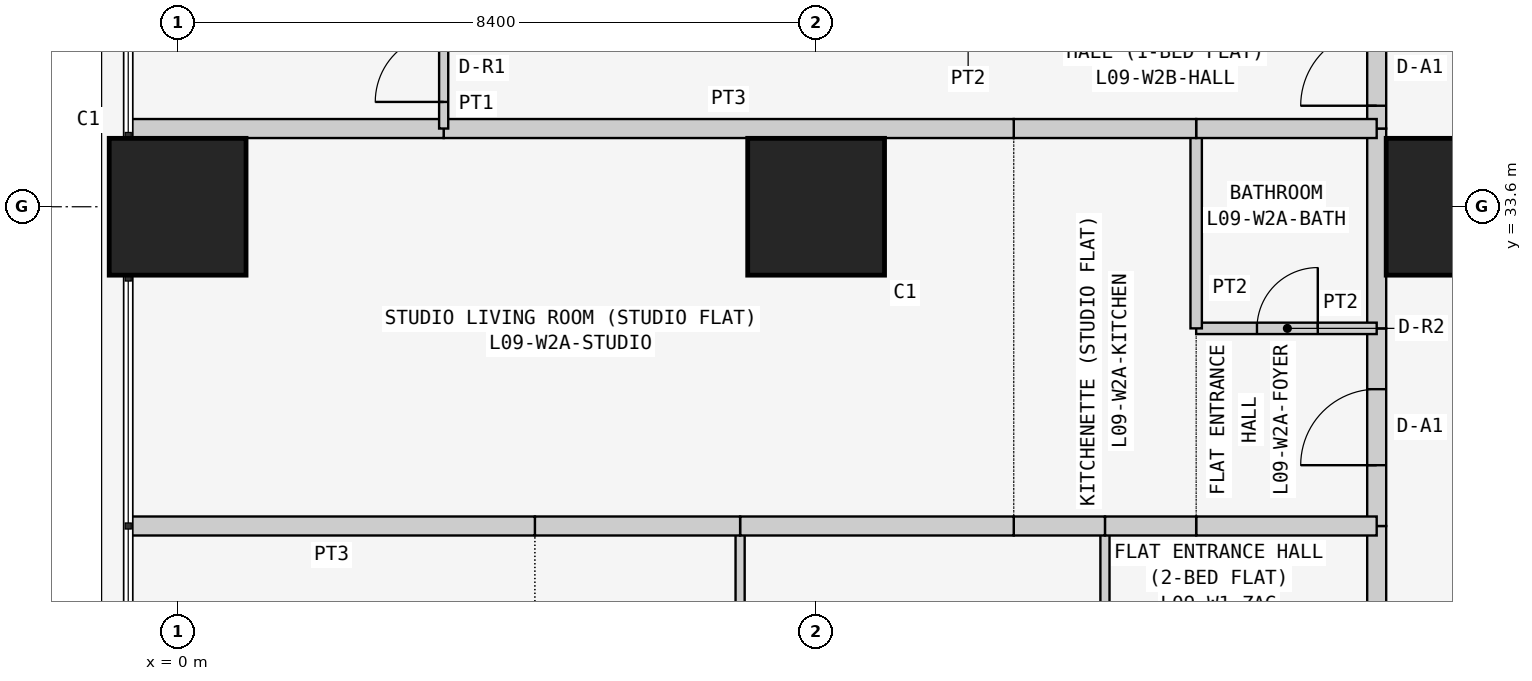
"""IFC4 building model, lengths in metres.
Left out: names, types, materials, properties, quantities, classifications, styles, units other than length and angle.
Written with IfcOpenShell. Run it as: python <this file> out.ifc"""

import sys

from ifc_helpers import new_model, si_unit, direction, frame, frame_2d, origin, origin_2d, place, context, subcontext, project, spatial, rectangle, extrude, element, fill, save


model = new_model("IFC4")
c1 = context("Model", 3, precision=1e-05, world=origin(), true_north=direction((0.0, 1.0)))
c2 = subcontext(c1, "Body", "Model", "MODEL_VIEW")
j1 = project(units=[si_unit("LENGTHUNIT", "METRE"), si_unit("PLANEANGLEUNIT", "RADIAN")], contexts=[c1])
p1 = place(None, origin())
s1 = spatial("IfcSite", under=j1, at=p1, CompositionType="ELEMENT")
p2 = place(p1, origin())
s2 = spatial("IfcBuilding", under=s1, at=p2, CompositionType="ELEMENT")
p3 = place(p2, frame((0.0, 0.0, 41.7)))
s3 = spatial("IfcBuildingStorey", under=s2, at=p3, CompositionType="ELEMENT", Elevation=41.7)
for number, where, z_axis, x_axis in (
    (1, (0.0, 33.6, 0.0), (0.0, 0.0, 1.0), (1.0, 0.0, 0.0)),
    (2, (8.4, 33.6, 0.0), (0.0, 0.0, 1.0), (1.0, 0.0, 0.0)),
    (3, (16.8, 33.6, 0.0), (0.0, 0.0, 1.0), (1.0, 0.0, 0.0)),
):
    element("IfcColumn", number, at=place(p3, frame(where, z_axis=z_axis, x_axis=x_axis)), inside=s3, PredefinedType="COLUMN", context=c2, shape_type="SweptSolid", body=[
        extrude(rectangle(XDim=1.8, YDim=1.8, at=origin_2d()), origin(), (0.0, 0.0, 1.0), 3.6),
    ])
p4 = place(p3, frame((15.775, 24.171, 0.0), z_axis=(0.0, 0.0, 1.0), x_axis=(0.0, 1.0, 0.0)))
e4 = element("IfcWall", 4, at=p4, inside=s3, PredefinedType="PARTITIONING", context=c2, shape_type="SweptSolid", body=[
    extrude(rectangle(XDim=5.229, YDim=0.25, at=frame_2d((2.615, 0.0))), origin(), (0.0, 0.0, 1.0), 3.45),
])
p5 = place(p4, frame((2.129, 0.0, 0.0)))
e5 = element("IfcOpeningElement", 5, at=p5, cuts=e4, PredefinedType="OPENING", context=c2, shape_type="SweptSolid", body=[
    extrude(rectangle(XDim=1.0, YDim=2.1, at=frame_2d((0.5, 1.05))), frame((0.0, 0.135, 0.0), z_axis=(0.0, -1.0, 0.0), x_axis=(1.0, 0.0, 0.0)), (0.0, 0.0, 1.0), 0.27),
])
p6 = place(p3, frame((15.775, 29.4, 0.0), z_axis=(0.0, 0.0, 1.0), x_axis=(0.0, 1.0, 0.0)))
e6 = element("IfcWall", 6, at=p6, inside=s3, PredefinedType="PARTITIONING", context=c2, shape_type="SweptSolid", body=[
    extrude(rectangle(XDim=2.6, YDim=0.25, at=frame_2d((1.3, 0.0))), origin(), (0.0, 0.0, 1.0), 3.45),
])
p7 = place(p6, frame((0.8, 0.0, 0.0)))
e7 = element("IfcOpeningElement", 7, at=p7, cuts=e6, PredefinedType="OPENING", context=c2, shape_type="SweptSolid", body=[
    extrude(rectangle(XDim=1.0, YDim=2.1, at=frame_2d((0.5, 1.05))), frame((0.0, 0.135, 0.0), z_axis=(0.0, -1.0, 0.0), x_axis=(1.0, 0.0, 0.0)), (0.0, 0.0, 1.0), 0.27),
])
p8 = place(p3, frame((15.775, 32.0, 0.0), z_axis=(0.0, 0.0, 1.0), x_axis=(0.0, 1.0, 0.0)))
e8 = element("IfcWall", 8, at=p8, inside=s3, PredefinedType="PARTITIONING", context=c2, shape_type="SweptSolid", body=[
    extrude(rectangle(XDim=2.629, YDim=0.25, at=frame_2d((1.314, 0.0))), origin(), (0.0, 0.0, 1.0), 3.45),
])
p9 = place(p3, frame((15.775, 34.629, 0.0), z_axis=(0.0, 0.0, 1.0), x_axis=(0.0, 1.0, 0.0)))
e9 = element("IfcWall", 9, at=p9, inside=s3, PredefinedType="PARTITIONING", context=c2, shape_type="SweptSolid", body=[
    extrude(rectangle(XDim=1.6, YDim=0.25, at=frame_2d((0.8, 0.0))), origin(), (0.0, 0.0, 1.0), 3.45),
])
p10 = place(p9, frame((0.3, 0.0, 0.0)))
e10 = element("IfcOpeningElement", 10, at=p10, cuts=e9, PredefinedType="OPENING", context=c2, shape_type="SweptSolid", body=[
    extrude(rectangle(XDim=1.0, YDim=2.1, at=frame_2d((0.5, 1.05))), frame((0.0, 0.135, 0.0), z_axis=(0.0, -1.0, 0.0), x_axis=(1.0, 0.0, 0.0)), (0.0, 0.0, 1.0), 0.27),
])
p11 = place(p3, frame((12.2, 29.4, 0.0), z_axis=(0.0, 0.0, 1.0), x_axis=(0.0, -1.0, 0.0)))
e11 = element("IfcWall", 11, at=p11, inside=s3, PredefinedType="PARTITIONING", context=c2, shape_type="SweptSolid", body=[
    extrude(rectangle(XDim=5.229, YDim=0.12, at=frame_2d((2.615, 0.0))), origin(), (0.0, 0.0, 1.0), 3.45),
])
p12 = place(p3, frame((15.775, 29.4, 0.0), z_axis=(0.0, 0.0, 1.0), x_axis=(-1.0, 0.0, 0.0)))
e12 = element("IfcWall", 12, at=p12, inside=s3, PredefinedType="PARTITIONING", context=c2, shape_type="SweptSolid", body=[
    extrude(rectangle(XDim=2.375, YDim=0.25, at=frame_2d((1.188, 0.0))), origin(), (0.0, 0.0, 1.0), 3.45),
])
p13 = place(p3, frame((13.4, 29.4, 0.0), z_axis=(0.0, 0.0, 1.0), x_axis=(-1.0, 0.0, 0.0)))
e13 = element("IfcWall", 13, at=p13, inside=s3, PredefinedType="PARTITIONING", context=c2, shape_type="SweptSolid", body=[
    extrude(rectangle(XDim=1.2, YDim=0.25, at=frame_2d((0.6, 0.0))), origin(), (0.0, 0.0, 1.0), 3.45),
])
p14 = place(p3, frame((7.4, 29.4, 0.0), z_axis=(0.0, 0.0, 1.0), x_axis=(0.0, -1.0, 0.0)))
e14 = element("IfcWall", 14, at=p14, inside=s3, PredefinedType="PARTITIONING", context=c2, shape_type="SweptSolid", body=[
    extrude(rectangle(XDim=5.229, YDim=0.12, at=frame_2d((2.615, 0.0))), origin(), (0.0, 0.0, 1.0), 3.45),
])
p15 = place(p3, frame((12.2, 29.4, 0.0), z_axis=(0.0, 0.0, 1.0), x_axis=(-1.0, 0.0, 0.0)))
e15 = element("IfcWall", 15, at=p15, inside=s3, PredefinedType="PARTITIONING", context=c2, shape_type="SweptSolid", body=[
    extrude(rectangle(XDim=1.2, YDim=0.25, at=frame_2d((0.6, 0.0))), origin(), (0.0, 0.0, 1.0), 3.45),
])
p16 = place(p3, frame((11.0, 29.4, 0.0), z_axis=(0.0, 0.0, 1.0), x_axis=(-1.0, 0.0, 0.0)))
e16 = element("IfcWall", 16, at=p16, inside=s3, PredefinedType="PARTITIONING", context=c2, shape_type="SweptSolid", body=[
    extrude(rectangle(XDim=3.6, YDim=0.25, at=frame_2d((1.8, 0.0))), origin(), (0.0, 0.0, 1.0), 3.45),
])
p17 = place(p3, frame((7.4, 29.4, 0.0), z_axis=(0.0, 0.0, 1.0), x_axis=(-1.0, 0.0, 0.0)))
e17 = element("IfcWall", 17, at=p17, inside=s3, PredefinedType="PARTITIONING", context=c2, shape_type="SweptSolid", body=[
    extrude(rectangle(XDim=2.7, YDim=0.25, at=frame_2d((1.35, 0.0))), origin(), (0.0, 0.0, 1.0), 3.45),
])
p18 = place(p3, frame((4.7, 29.4, 0.0), z_axis=(0.0, 0.0, 1.0), x_axis=(-1.0, 0.0, 0.0)))
e18 = element("IfcWall", 18, at=p18, inside=s3, PredefinedType="PARTITIONING", context=c2, shape_type="SweptSolid", body=[
    extrude(rectangle(XDim=5.35, YDim=0.25, at=frame_2d((2.675, 0.0))), origin(), (0.0, 0.0, 1.0), 3.45),
])
p19 = place(p3, frame((13.4, 32.0, 0.0), z_axis=(0.0, 0.0, 1.0), x_axis=(1.0, 0.0, 0.0)))
e19 = element("IfcWall", 19, at=p19, inside=s3, PredefinedType="PARTITIONING", context=c2, shape_type="SweptSolid", body=[
    extrude(rectangle(XDim=2.375, YDim=0.15, at=frame_2d((1.188, 0.0))), origin(), (0.0, 0.0, 1.0), 3.45),
])
p20 = place(p19, frame((0.8, 0.0, 0.0)))
e20 = element("IfcOpeningElement", 20, at=p20, cuts=e19, PredefinedType="OPENING", context=c2, shape_type="SweptSolid", body=[
    extrude(rectangle(XDim=0.8, YDim=2.1, at=frame_2d((0.4, 1.05))), frame((0.0, 0.085, 0.0), z_axis=(0.0, -1.0, 0.0), x_axis=(1.0, 0.0, 0.0)), (0.0, 0.0, 1.0), 0.17),
])
p21 = place(p3, frame((13.4, 32.0, 0.0), z_axis=(0.0, 0.0, 1.0), x_axis=(0.0, 1.0, 0.0)))
e21 = element("IfcWall", 21, at=p21, inside=s3, PredefinedType="PARTITIONING", context=c2, shape_type="SweptSolid", body=[
    extrude(rectangle(XDim=2.629, YDim=0.15, at=frame_2d((1.314, 0.0))), origin(), (0.0, 0.0, 1.0), 3.45),
])
p22 = place(p3, frame((13.4, 34.629, 0.0), z_axis=(0.0, 0.0, 1.0), x_axis=(1.0, 0.0, 0.0)))
e22 = element("IfcWall", 22, at=p22, inside=s3, PredefinedType="PARTITIONING", context=c2, shape_type="SweptSolid", body=[
    extrude(rectangle(XDim=2.375, YDim=0.25, at=frame_2d((1.188, 0.0))), origin(), (0.0, 0.0, 1.0), 3.45),
])
p23 = place(p3, frame((11.0, 34.629, 0.0), z_axis=(0.0, 0.0, 1.0), x_axis=(1.0, 0.0, 0.0)))
e23 = element("IfcWall", 23, at=p23, inside=s3, PredefinedType="PARTITIONING", context=c2, shape_type="SweptSolid", body=[
    extrude(rectangle(XDim=2.4, YDim=0.25, at=frame_2d((1.2, 0.0))), origin(), (0.0, 0.0, 1.0), 3.45),
])
p24 = place(p3, frame((3.5, 34.629, 0.0), z_axis=(0.0, 0.0, 1.0), x_axis=(1.0, 0.0, 0.0)))
e24 = element("IfcWall", 24, at=p24, inside=s3, PredefinedType="PARTITIONING", context=c2, shape_type="SweptSolid", body=[
    extrude(rectangle(XDim=7.5, YDim=0.25, at=frame_2d((3.75, 0.0))), origin(), (0.0, 0.0, 1.0), 3.45),
])
p25 = place(p3, frame((-0.65, 34.629, 0.0), z_axis=(0.0, 0.0, 1.0), x_axis=(1.0, 0.0, 0.0)))
e25 = element("IfcWall", 25, at=p25, inside=s3, PredefinedType="PARTITIONING", context=c2, shape_type="SweptSolid", body=[
    extrude(rectangle(XDim=4.15, YDim=0.25, at=frame_2d((2.075, 0.0))), origin(), (0.0, 0.0, 1.0), 3.45),
])
p26 = place(p3, frame((3.5, 34.629, 0.0), z_axis=(0.0, 0.0, 1.0), x_axis=(0.0, 1.0, 0.0)))
e26 = element("IfcWall", 26, at=p26, inside=s3, PredefinedType="PARTITIONING", context=c2, shape_type="SweptSolid", body=[
    extrude(rectangle(XDim=1.6, YDim=0.12, at=frame_2d((0.8, 0.0))), origin(), (0.0, 0.0, 1.0), 3.45),
])
p27 = place(p26, frame((0.35, 0.0, 0.0)))
e27 = element("IfcOpeningElement", 27, at=p27, cuts=e26, PredefinedType="OPENING", context=c2, shape_type="SweptSolid", body=[
    extrude(rectangle(XDim=0.9, YDim=2.1, at=frame_2d((0.45, 1.05))), frame((0.0, 0.07, 0.0), z_axis=(0.0, -1.0, 0.0), x_axis=(1.0, 0.0, 0.0)), (0.0, 0.0, 1.0), 0.14),
])
p28 = place(p7, origin())
e28 = element("IfcDoor", 28, at=p28, inside=s3, OperationType="SINGLE_SWING_LEFT", PredefinedType="DOOR", context=c2, shape_type="SweptSolid", body=[
    extrude(rectangle(XDim=1.0, YDim=2.1, at=frame_2d((0.5, 1.05))), frame((0.0, 0.025, 0.0), z_axis=(0.0, -1.0, 0.0), x_axis=(1.0, 0.0, 0.0)), (0.0, 0.0, 1.0), 0.05),
])
fill(e7, e28)
p29 = place(p20, origin())
e29 = element("IfcDoor", 29, at=p29, inside=s3, OperationType="SINGLE_SWING_RIGHT", PredefinedType="DOOR", context=c2, shape_type="SweptSolid", body=[
    extrude(rectangle(XDim=0.8, YDim=2.1, at=frame_2d((0.4, 1.05))), frame((0.0, 0.025, 0.0), z_axis=(0.0, -1.0, 0.0), x_axis=(1.0, 0.0, 0.0)), (0.0, 0.0, 1.0), 0.05),
])
fill(e20, e29)
p30 = place(p10, origin())
e30 = element("IfcDoor", 30, at=p30, inside=s3, OperationType="SINGLE_SWING_LEFT", PredefinedType="DOOR", context=c2, shape_type="SweptSolid", body=[
    extrude(rectangle(XDim=1.0, YDim=2.1, at=frame_2d((0.5, 1.05))), frame((0.0, 0.025, 0.0), z_axis=(0.0, -1.0, 0.0), x_axis=(1.0, 0.0, 0.0)), (0.0, 0.0, 1.0), 0.05),
])
fill(e10, e30)
p31 = place(p27, origin())
e31 = element("IfcDoor", 31, at=p31, inside=s3, OperationType="SINGLE_SWING_LEFT", PredefinedType="DOOR", context=c2, shape_type="SweptSolid", body=[
    extrude(rectangle(XDim=0.9, YDim=2.1, at=frame_2d((0.45, 1.05))), frame((0.0, 0.025, 0.0), z_axis=(0.0, -1.0, 0.0), x_axis=(1.0, 0.0, 0.0)), (0.0, 0.0, 1.0), 0.05),
])
fill(e27, e31)
save(model, sys.argv[1])
